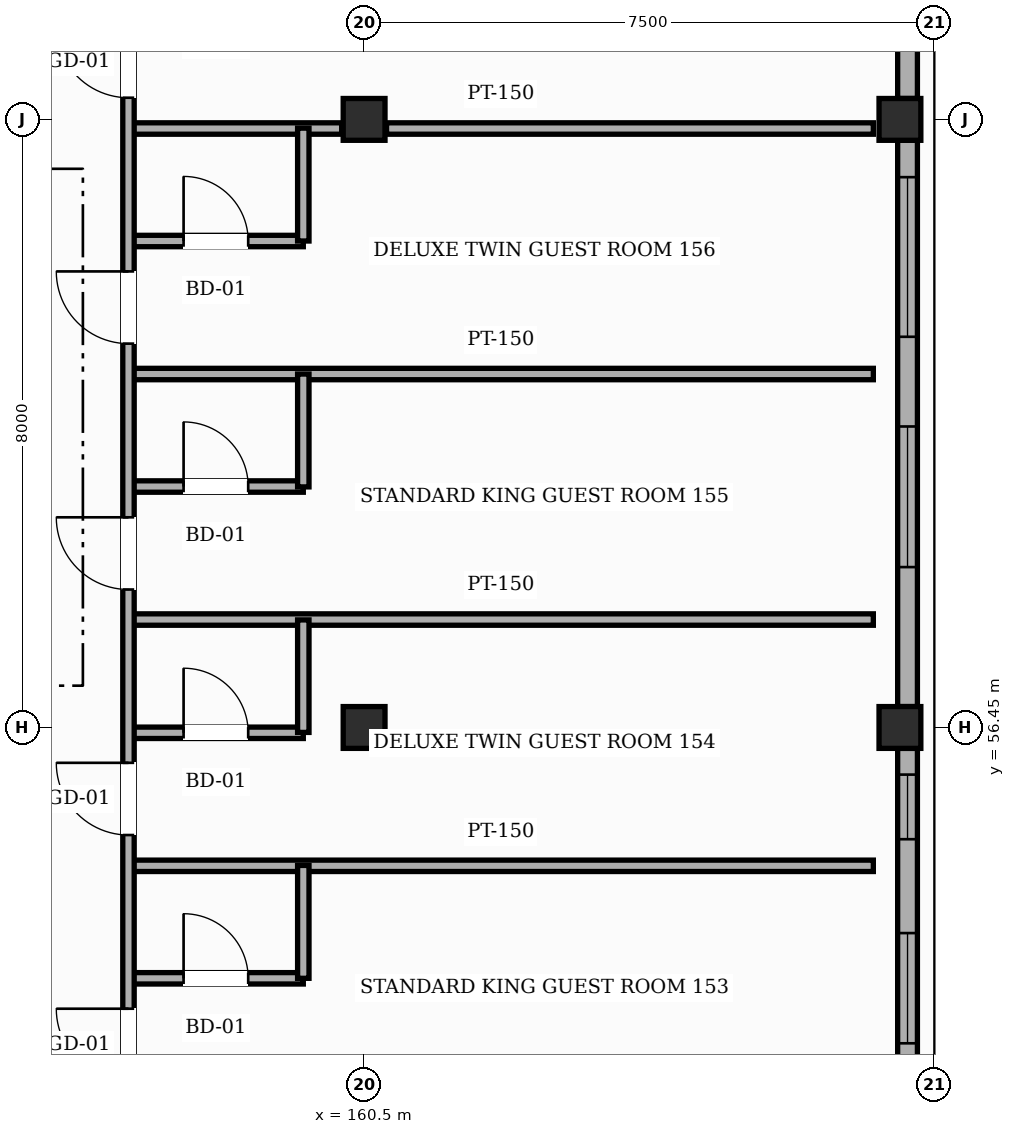
"""IFC4 building model, lengths in metres.
Left out: names, types, materials, properties, quantities, classifications, styles, units other than length and angle.
Written with IfcOpenShell. Run it as: python <this file> out.ifc"""

import sys

from ifc_helpers import new_model, si_unit, direction, frame, frame_2d, origin, origin_2d, place, context, subcontext, project, spatial, rectangle, hollow_rectangle, extrude, element, fill, save


model = new_model("IFC4")
c1 = context("Model", 3, precision=1e-05, world=origin(), true_north=direction((0.0, 1.0)))
c2 = subcontext(c1, "Body", "Model", "MODEL_VIEW")
j1 = project(units=[si_unit("LENGTHUNIT", "METRE"), si_unit("PLANEANGLEUNIT", "RADIAN")], contexts=[c1])
p1 = place(None, origin())
s1 = spatial("IfcSite", under=j1, at=p1, CompositionType="ELEMENT")
p2 = place(p1, origin())
s2 = spatial("IfcBuilding", under=s1, at=p2, CompositionType="ELEMENT")
p3 = place(p2, frame((0.0, 0.0, 28.2)))
s3 = spatial("IfcBuildingStorey", under=s2, at=p3, CompositionType="ELEMENT", Elevation=28.2)
for number, where, z_axis, x_axis in (
    (1, (160.5, 56.45, 0.0), (0.0, 0.0, 1.0), (1.0, 0.0, 0.0)),
    (2, (160.5, 64.45, 0.0), (0.0, 0.0, 1.0), (1.0, 0.0, 0.0)),
    (3, (167.55, 56.45, 0.0), (0.0, 0.0, 1.0), (1.0, 0.0, 0.0)),
    (4, (167.55, 64.45, 0.0), (0.0, 0.0, 1.0), (1.0, 0.0, 0.0)),
):
    element("IfcColumn", number, at=place(p3, frame(where, z_axis=z_axis, x_axis=x_axis)), inside=s3, PredefinedType="COLUMN", context=c2, shape_type="SweptSolid", body=[
        extrude(hollow_rectangle(XDim=0.55, YDim=0.55, WallThickness=0.022, InnerFilletRadius=0.022, OuterFilletRadius=0.044, at=origin_2d()), origin(), (0.0, 0.0, 1.0), 3.6),
    ])
p4 = place(p3, frame((167.65, 56.175, 0.0), z_axis=(0.0, 0.0, 1.0), x_axis=(0.0, -1.0, 0.0)))
e5 = element("IfcWall", 5, at=p4, inside=s3, PredefinedType="SOLIDWALL", context=c2, shape_type="SweptSolid", body=[
    extrude(rectangle(XDim=7.45, YDim=0.26, at=frame_2d((3.725, 0.0))), origin(), (0.0, 0.0, 1.0), 2.755),
])
p5 = place(p4, frame((5.485, 0.0, 0.85)))
e6 = element("IfcOpeningElement", 6, at=p5, cuts=e5, PredefinedType="OPENING", context=c2, shape_type="SweptSolid", body=[
    extrude(rectangle(XDim=1.25, YDim=1.65, at=frame_2d((0.625, 0.825))), frame((0.0, 0.14, 0.0), z_axis=(0.0, -1.0, 0.0), x_axis=(1.0, 0.0, 0.0)), (0.0, 0.0, 1.0), 0.28),
])
p6 = place(p4, frame((2.43, 0.0, 0.85)))
e7 = element("IfcOpeningElement", 7, at=p6, cuts=e5, PredefinedType="OPENING", context=c2, shape_type="SweptSolid", body=[
    extrude(rectangle(XDim=1.45, YDim=1.65, at=frame_2d((0.725, 0.825))), frame((0.0, 0.14, 0.0), z_axis=(0.0, -1.0, 0.0), x_axis=(1.0, 0.0, 0.0)), (0.0, 0.0, 1.0), 0.28),
])
p7 = place(p4, frame((0.345, 0.0, 0.85)))
e8 = element("IfcOpeningElement", 8, at=p7, cuts=e5, PredefinedType="OPENING", context=c2, shape_type="SweptSolid", body=[
    extrude(rectangle(XDim=0.85, YDim=1.35, at=frame_2d((0.425, 0.675))), frame((0.0, 0.14, 0.0), z_axis=(0.0, -1.0, 0.0), x_axis=(1.0, 0.0, 0.0)), (0.0, 0.0, 1.0), 0.28),
])
p8 = place(p3, frame((167.65, 64.175, 0.0), z_axis=(0.0, 0.0, 1.0), x_axis=(0.0, -1.0, 0.0)))
e9 = element("IfcWall", 9, at=p8, inside=s3, PredefinedType="SOLIDWALL", context=c2, shape_type="SweptSolid", body=[
    extrude(rectangle(XDim=7.45, YDim=0.26, at=frame_2d((3.725, 0.0))), origin(), (0.0, 0.0, 1.0), 2.755),
])
p9 = place(p8, frame((3.765, 0.0, 0.85)))
e10 = element("IfcOpeningElement", 10, at=p9, cuts=e9, PredefinedType="OPENING", context=c2, shape_type="SweptSolid", body=[
    extrude(rectangle(XDim=1.85, YDim=1.65, at=frame_2d((0.925, 0.825))), frame((0.0, 0.14, 0.0), z_axis=(0.0, -1.0, 0.0), x_axis=(1.0, 0.0, 0.0)), (0.0, 0.0, 1.0), 0.28),
])
p10 = place(p8, frame((0.485, 0.0, 0.85)))
e11 = element("IfcOpeningElement", 11, at=p10, cuts=e9, PredefinedType="OPENING", context=c2, shape_type="SweptSolid", body=[
    extrude(rectangle(XDim=2.1, YDim=1.65, at=frame_2d((1.05, 0.825))), frame((0.0, 0.14, 0.0), z_axis=(0.0, -1.0, 0.0), x_axis=(1.0, 0.0, 0.0)), (0.0, 0.0, 1.0), 0.28),
])
p11 = place(p3, frame((167.65, 70.8, 0.0), z_axis=(0.0, 0.0, 1.0), x_axis=(0.0, -1.0, 0.0)))
e12 = element("IfcWall", 12, at=p11, inside=s3, PredefinedType="SOLIDWALL", context=c2, shape_type="SweptSolid", body=[
    extrude(rectangle(XDim=6.075, YDim=0.26, at=frame_2d((3.038, 0.0))), origin(), (0.0, 0.0, 1.0), 3.365),
])
p12 = place(p11, frame((4.08, 0.0, 0.85)))
e13 = element("IfcOpeningElement", 13, at=p12, cuts=e12, PredefinedType="OPENING", context=c2, shape_type="SweptSolid", body=[
    extrude(rectangle(XDim=1.15, YDim=1.8, at=frame_2d((0.575, 0.9))), frame((0.0, 0.14, 0.0), z_axis=(0.0, -1.0, 0.0), x_axis=(1.0, 0.0, 0.0)), (0.0, 0.0, 1.0), 0.28),
])
p13 = place(p11, frame((0.94, 0.0, 0.85)))
e14 = element("IfcOpeningElement", 14, at=p13, cuts=e12, PredefinedType="OPENING", context=c2, shape_type="SweptSolid", body=[
    extrude(rectangle(XDim=1.35, YDim=1.8, at=frame_2d((0.675, 0.9))), frame((0.0, 0.14, 0.0), z_axis=(0.0, -1.0, 0.0), x_axis=(1.0, 0.0, 0.0)), (0.0, 0.0, 1.0), 0.28),
])
p14 = place(p3, frame((157.4, 53.15, 0.0), z_axis=(0.0, 0.0, 1.0), x_axis=(1.0, 0.0, 0.0)))
e15 = element("IfcWall", 15, at=p14, inside=s3, PredefinedType="PARTITIONING", context=c2, shape_type="SweptSolid", body=[
    extrude(rectangle(XDim=2.3, YDim=0.15, at=frame_2d((1.15, 0.0))), origin(), (0.0, 0.0, 1.0), 3.365),
])
p15 = place(p14, frame((0.725, 0.0, 0.0)))
e16 = element("IfcOpeningElement", 16, at=p15, cuts=e15, PredefinedType="OPENING", context=c2, shape_type="SweptSolid", body=[
    extrude(rectangle(XDim=0.85, YDim=2.1, at=frame_2d((0.425, 1.05))), frame((0.0, 0.085, 0.0), z_axis=(0.0, -1.0, 0.0), x_axis=(1.0, 0.0, 0.0)), (0.0, 0.0, 1.0), 0.17),
])
p16 = place(p3, frame((157.4, 54.63, 0.0), z_axis=(0.0, 0.0, 1.0), x_axis=(1.0, 0.0, 0.0)))
e17 = element("IfcWall", 17, at=p16, inside=s3, PredefinedType="PARTITIONING", context=c2, shape_type="SweptSolid", body=[
    extrude(rectangle(XDim=9.8, YDim=0.15, at=frame_2d((4.9, 0.0))), origin(), (0.0, 0.0, 1.0), 3.365),
])
p17 = place(p3, frame((157.4, 56.38, 0.0), z_axis=(0.0, 0.0, 1.0), x_axis=(1.0, 0.0, 0.0)))
e18 = element("IfcWall", 18, at=p17, inside=s3, PredefinedType="PARTITIONING", context=c2, shape_type="SweptSolid", body=[
    extrude(rectangle(XDim=2.3, YDim=0.15, at=frame_2d((1.15, 0.0))), origin(), (0.0, 0.0, 1.0), 2.805),
])
p18 = place(p17, frame((0.725, 0.0, 0.0)))
e19 = element("IfcOpeningElement", 19, at=p18, cuts=e18, PredefinedType="OPENING", context=c2, shape_type="SweptSolid", body=[
    extrude(rectangle(XDim=0.85, YDim=2.1, at=frame_2d((0.425, 1.05))), frame((0.0, 0.085, 0.0), z_axis=(0.0, -1.0, 0.0), x_axis=(1.0, 0.0, 0.0)), (0.0, 0.0, 1.0), 0.17),
])
p19 = place(p3, frame((157.4, 57.87, 0.0), z_axis=(0.0, 0.0, 1.0), x_axis=(1.0, 0.0, 0.0)))
e20 = element("IfcWall", 20, at=p19, inside=s3, PredefinedType="PARTITIONING", context=c2, shape_type="SweptSolid", body=[
    extrude(rectangle(XDim=9.8, YDim=0.15, at=frame_2d((4.9, 0.0))), origin(), (0.0, 0.0, 1.0), 3.365),
])
p20 = place(p3, frame((157.4, 59.62, 0.0), z_axis=(0.0, 0.0, 1.0), x_axis=(1.0, 0.0, 0.0)))
e21 = element("IfcWall", 21, at=p20, inside=s3, PredefinedType="PARTITIONING", context=c2, shape_type="SweptSolid", body=[
    extrude(rectangle(XDim=2.3, YDim=0.15, at=frame_2d((1.15, 0.0))), origin(), (0.0, 0.0, 1.0), 3.365),
])
p21 = place(p20, frame((0.725, 0.0, 0.0)))
e22 = element("IfcOpeningElement", 22, at=p21, cuts=e21, PredefinedType="OPENING", context=c2, shape_type="SweptSolid", body=[
    extrude(rectangle(XDim=0.85, YDim=2.1, at=frame_2d((0.425, 1.05))), frame((0.0, 0.085, 0.0), z_axis=(0.0, -1.0, 0.0), x_axis=(1.0, 0.0, 0.0)), (0.0, 0.0, 1.0), 0.17),
])
p22 = place(p3, frame((157.4, 61.1, 0.0), z_axis=(0.0, 0.0, 1.0), x_axis=(1.0, 0.0, 0.0)))
e23 = element("IfcWall", 23, at=p22, inside=s3, PredefinedType="PARTITIONING", context=c2, shape_type="SweptSolid", body=[
    extrude(rectangle(XDim=9.8, YDim=0.15, at=frame_2d((4.9, 0.0))), origin(), (0.0, 0.0, 1.0), 3.365),
])
p23 = place(p3, frame((157.4, 62.85, 0.0), z_axis=(0.0, 0.0, 1.0), x_axis=(1.0, 0.0, 0.0)))
e24 = element("IfcWall", 24, at=p23, inside=s3, PredefinedType="PARTITIONING", context=c2, shape_type="SweptSolid", body=[
    extrude(rectangle(XDim=2.3, YDim=0.15, at=frame_2d((1.15, 0.0))), origin(), (0.0, 0.0, 1.0), 3.365),
])
p24 = place(p23, frame((0.725, 0.0, 0.0)))
e25 = element("IfcOpeningElement", 25, at=p24, cuts=e24, PredefinedType="OPENING", context=c2, shape_type="SweptSolid", body=[
    extrude(rectangle(XDim=0.85, YDim=2.1, at=frame_2d((0.425, 1.05))), frame((0.0, 0.085, 0.0), z_axis=(0.0, -1.0, 0.0), x_axis=(1.0, 0.0, 0.0)), (0.0, 0.0, 1.0), 0.17),
])
p25 = place(p3, frame((157.4, 64.33, 0.0), z_axis=(0.0, 0.0, 1.0), x_axis=(1.0, 0.0, 0.0)))
e26 = element("IfcWall", 26, at=p25, inside=s3, PredefinedType="PARTITIONING", context=c2, shape_type="SweptSolid", body=[
    extrude(rectangle(XDim=2.805, YDim=0.15, at=frame_2d((1.403, 0.0))), origin(), (0.0, 0.0, 1.0), 2.805),
])
p26 = place(p3, frame((160.795, 64.33, 0.0), z_axis=(0.0, 0.0, 1.0), x_axis=(1.0, 0.0, 0.0)))
e27 = element("IfcWall", 27, at=p26, inside=s3, PredefinedType="PARTITIONING", context=c2, shape_type="SweptSolid", body=[
    extrude(rectangle(XDim=6.405, YDim=0.15, at=frame_2d((3.203, 0.0))), origin(), (0.0, 0.0, 1.0), 2.855),
])
p27 = place(p3, frame((157.4, 22.3, 0.0), z_axis=(0.0, 0.0, 1.0), x_axis=(0.0, 1.0, 0.0)))
e28 = element("IfcWall", 28, at=p27, inside=s3, PredefinedType="PARTITIONING", context=c2, shape_type="SweptSolid", body=[
    extrude(rectangle(XDim=48.5, YDim=0.15, at=frame_2d((24.25, 0.0))), origin(), (0.0, 0.0, 1.0), 3.365),
])
p28 = place(p27, frame((0.325, 0.0, 0.0)))
e29 = element("IfcOpeningElement", 29, at=p28, cuts=e28, PredefinedType="OPENING", context=c2, shape_type="SweptSolid", body=[
    extrude(rectangle(XDim=1.1, YDim=2.2, at=frame_2d((0.55, 1.1))), frame((0.0, 0.085, 0.0), z_axis=(0.0, -1.0, 0.0), x_axis=(1.0, 0.0, 0.0)), (0.0, 0.0, 1.0), 0.17),
])
p29 = place(p27, frame((3.635, 0.0, 0.0)))
e30 = element("IfcOpeningElement", 30, at=p29, cuts=e28, PredefinedType="OPENING", context=c2, shape_type="SweptSolid", body=[
    extrude(rectangle(XDim=0.95, YDim=2.15, at=frame_2d((0.475, 1.075))), frame((0.0, 0.085, 0.0), z_axis=(0.0, -1.0, 0.0), x_axis=(1.0, 0.0, 0.0)), (0.0, 0.0, 1.0), 0.17),
])
p30 = place(p27, frame((6.865, 0.0, 0.0)))
e31 = element("IfcOpeningElement", 31, at=p30, cuts=e28, PredefinedType="OPENING", context=c2, shape_type="SweptSolid", body=[
    extrude(rectangle(XDim=0.95, YDim=2.15, at=frame_2d((0.475, 1.075))), frame((0.0, 0.085, 0.0), z_axis=(0.0, -1.0, 0.0), x_axis=(1.0, 0.0, 0.0)), (0.0, 0.0, 1.0), 0.17),
])
p31 = place(p27, frame((10.1, 0.0, 0.0)))
e32 = element("IfcOpeningElement", 32, at=p31, cuts=e28, PredefinedType="OPENING", context=c2, shape_type="SweptSolid", body=[
    extrude(rectangle(XDim=0.95, YDim=2.15, at=frame_2d((0.475, 1.075))), frame((0.0, 0.085, 0.0), z_axis=(0.0, -1.0, 0.0), x_axis=(1.0, 0.0, 0.0)), (0.0, 0.0, 1.0), 0.17),
])
p32 = place(p27, frame((13.335, 0.0, 0.0)))
e33 = element("IfcOpeningElement", 33, at=p32, cuts=e28, PredefinedType="OPENING", context=c2, shape_type="SweptSolid", body=[
    extrude(rectangle(XDim=0.95, YDim=2.15, at=frame_2d((0.475, 1.075))), frame((0.0, 0.085, 0.0), z_axis=(0.0, -1.0, 0.0), x_axis=(1.0, 0.0, 0.0)), (0.0, 0.0, 1.0), 0.17),
])
p33 = place(p27, frame((16.565, 0.0, 0.0)))
e34 = element("IfcOpeningElement", 34, at=p33, cuts=e28, PredefinedType="OPENING", context=c2, shape_type="SweptSolid", body=[
    extrude(rectangle(XDim=0.95, YDim=2.15, at=frame_2d((0.475, 1.075))), frame((0.0, 0.085, 0.0), z_axis=(0.0, -1.0, 0.0), x_axis=(1.0, 0.0, 0.0)), (0.0, 0.0, 1.0), 0.17),
])
p34 = place(p27, frame((19.8, 0.0, 0.0)))
e35 = element("IfcOpeningElement", 35, at=p34, cuts=e28, PredefinedType="OPENING", context=c2, shape_type="SweptSolid", body=[
    extrude(rectangle(XDim=0.95, YDim=2.15, at=frame_2d((0.475, 1.075))), frame((0.0, 0.085, 0.0), z_axis=(0.0, -1.0, 0.0), x_axis=(1.0, 0.0, 0.0)), (0.0, 0.0, 1.0), 0.17),
])
p35 = place(p27, frame((23.035, 0.0, 0.0)))
e36 = element("IfcOpeningElement", 36, at=p35, cuts=e28, PredefinedType="OPENING", context=c2, shape_type="SweptSolid", body=[
    extrude(rectangle(XDim=0.95, YDim=2.15, at=frame_2d((0.475, 1.075))), frame((0.0, 0.085, 0.0), z_axis=(0.0, -1.0, 0.0), x_axis=(1.0, 0.0, 0.0)), (0.0, 0.0, 1.0), 0.17),
])
p36 = place(p27, frame((26.265, 0.0, 0.0)))
e37 = element("IfcOpeningElement", 37, at=p36, cuts=e28, PredefinedType="OPENING", context=c2, shape_type="SweptSolid", body=[
    extrude(rectangle(XDim=0.95, YDim=2.15, at=frame_2d((0.475, 1.075))), frame((0.0, 0.085, 0.0), z_axis=(0.0, -1.0, 0.0), x_axis=(1.0, 0.0, 0.0)), (0.0, 0.0, 1.0), 0.17),
])
p37 = place(p27, frame((29.5, 0.0, 0.0)))
e38 = element("IfcOpeningElement", 38, at=p37, cuts=e28, PredefinedType="OPENING", context=c2, shape_type="SweptSolid", body=[
    extrude(rectangle(XDim=0.95, YDim=2.15, at=frame_2d((0.475, 1.075))), frame((0.0, 0.085, 0.0), z_axis=(0.0, -1.0, 0.0), x_axis=(1.0, 0.0, 0.0)), (0.0, 0.0, 1.0), 0.17),
])
p38 = place(p27, frame((32.735, 0.0, 0.0)))
e39 = element("IfcOpeningElement", 39, at=p38, cuts=e28, PredefinedType="OPENING", context=c2, shape_type="SweptSolid", body=[
    extrude(rectangle(XDim=0.95, YDim=2.15, at=frame_2d((0.475, 1.075))), frame((0.0, 0.085, 0.0), z_axis=(0.0, -1.0, 0.0), x_axis=(1.0, 0.0, 0.0)), (0.0, 0.0, 1.0), 0.17),
])
p39 = place(p27, frame((35.965, 0.0, 0.0)))
e40 = element("IfcOpeningElement", 40, at=p39, cuts=e28, PredefinedType="OPENING", context=c2, shape_type="SweptSolid", body=[
    extrude(rectangle(XDim=0.95, YDim=2.15, at=frame_2d((0.475, 1.075))), frame((0.0, 0.085, 0.0), z_axis=(0.0, -1.0, 0.0), x_axis=(1.0, 0.0, 0.0)), (0.0, 0.0, 1.0), 0.17),
])
p40 = place(p27, frame((39.2, 0.0, 0.0)))
e41 = element("IfcOpeningElement", 41, at=p40, cuts=e28, PredefinedType="OPENING", context=c2, shape_type="SweptSolid", body=[
    extrude(rectangle(XDim=0.95, YDim=2.15, at=frame_2d((0.475, 1.075))), frame((0.0, 0.085, 0.0), z_axis=(0.0, -1.0, 0.0), x_axis=(1.0, 0.0, 0.0)), (0.0, 0.0, 1.0), 0.17),
])
p41 = place(p27, frame((42.435, 0.0, 0.0)))
e42 = element("IfcOpeningElement", 42, at=p41, cuts=e28, PredefinedType="OPENING", context=c2, shape_type="SweptSolid", body=[
    extrude(rectangle(XDim=0.95, YDim=2.15, at=frame_2d((0.475, 1.075))), frame((0.0, 0.085, 0.0), z_axis=(0.0, -1.0, 0.0), x_axis=(1.0, 0.0, 0.0)), (0.0, 0.0, 1.0), 0.17),
])
p42 = place(p27, frame((45.665, 0.0, 0.0)))
e43 = element("IfcOpeningElement", 43, at=p42, cuts=e28, PredefinedType="OPENING", context=c2, shape_type="SweptSolid", body=[
    extrude(rectangle(XDim=0.95, YDim=2.15, at=frame_2d((0.475, 1.075))), frame((0.0, 0.085, 0.0), z_axis=(0.0, -1.0, 0.0), x_axis=(1.0, 0.0, 0.0)), (0.0, 0.0, 1.0), 0.17),
])
p43 = place(p3, frame((159.7, 53.15, 0.0), z_axis=(0.0, 0.0, 1.0), x_axis=(0.0, 1.0, 0.0)))
e44 = element("IfcWall", 44, at=p43, inside=s3, PredefinedType="PARTITIONING", context=c2, shape_type="SweptSolid", body=[
    extrude(rectangle(XDim=1.485, YDim=0.15, at=frame_2d((0.743, 0.0))), origin(), (0.0, 0.0, 1.0), 3.365),
])
p44 = place(p3, frame((159.7, 56.385, 0.0), z_axis=(0.0, 0.0, 1.0), x_axis=(0.0, 1.0, 0.0)))
e45 = element("IfcWall", 45, at=p44, inside=s3, PredefinedType="PARTITIONING", context=c2, shape_type="SweptSolid", body=[
    extrude(rectangle(XDim=1.48, YDim=0.15, at=frame_2d((0.74, 0.0))), origin(), (0.0, 0.0, 1.0), 3.365),
])
p45 = place(p3, frame((159.7, 59.615, 0.0), z_axis=(0.0, 0.0, 1.0), x_axis=(0.0, 1.0, 0.0)))
e46 = element("IfcWall", 46, at=p45, inside=s3, PredefinedType="PARTITIONING", context=c2, shape_type="SweptSolid", body=[
    extrude(rectangle(XDim=1.485, YDim=0.15, at=frame_2d((0.743, 0.0))), origin(), (0.0, 0.0, 1.0), 3.365),
])
p46 = place(p3, frame((159.7, 62.85, 0.0), z_axis=(0.0, 0.0, 1.0), x_axis=(0.0, 1.0, 0.0)))
e47 = element("IfcWall", 47, at=p46, inside=s3, PredefinedType="PARTITIONING", context=c2, shape_type="SweptSolid", body=[
    extrude(rectangle(XDim=1.485, YDim=0.15, at=frame_2d((0.742, 0.0))), origin(), (0.0, 0.0, 1.0), 3.365),
])
p47 = place(p6, origin())
e48 = element("IfcWindow", 48, at=p47, inside=s3, PartitioningType="SINGLE_PANEL", PredefinedType="WINDOW", context=c2, shape_type="SweptSolid", body=[
    extrude(rectangle(XDim=1.45, YDim=1.65, at=frame_2d((0.725, 0.825))), frame((0.0, 0.03, 0.0), z_axis=(0.0, -1.0, 0.0), x_axis=(1.0, 0.0, 0.0)), (0.0, 0.0, 1.0), 0.06),
])
fill(e7, e48)
p48 = place(p7, origin())
e49 = element("IfcWindow", 49, at=p48, inside=s3, PartitioningType="SINGLE_PANEL", PredefinedType="WINDOW", context=c2, shape_type="SweptSolid", body=[
    extrude(rectangle(XDim=0.85, YDim=1.35, at=frame_2d((0.425, 0.675))), frame((0.0, 0.03, 0.0), z_axis=(0.0, -1.0, 0.0), x_axis=(1.0, 0.0, 0.0)), (0.0, 0.0, 1.0), 0.06),
])
fill(e8, e49)
p49 = place(p9, origin())
e50 = element("IfcWindow", 50, at=p49, inside=s3, PartitioningType="SINGLE_PANEL", PredefinedType="WINDOW", context=c2, shape_type="SweptSolid", body=[
    extrude(rectangle(XDim=1.85, YDim=1.65, at=frame_2d((0.925, 0.825))), frame((0.0, 0.03, 0.0), z_axis=(0.0, -1.0, 0.0), x_axis=(1.0, 0.0, 0.0)), (0.0, 0.0, 1.0), 0.06),
])
fill(e10, e50)
p50 = place(p10, origin())
e51 = element("IfcWindow", 51, at=p50, inside=s3, PartitioningType="SINGLE_PANEL", PredefinedType="WINDOW", context=c2, shape_type="SweptSolid", body=[
    extrude(rectangle(XDim=2.1, YDim=1.65, at=frame_2d((1.05, 0.825))), frame((0.0, 0.03, 0.0), z_axis=(0.0, -1.0, 0.0), x_axis=(1.0, 0.0, 0.0)), (0.0, 0.0, 1.0), 0.06),
])
fill(e11, e51)
p51 = place(p37, origin())
e52 = element("IfcDoor", 52, at=p51, inside=s3, OperationType="SINGLE_SWING_RIGHT", PredefinedType="DOOR", context=c2, shape_type="SweptSolid", body=[
    extrude(rectangle(XDim=0.95, YDim=2.15, at=frame_2d((0.475, 1.075))), frame((0.0, 0.025, 0.0), z_axis=(0.0, -1.0, 0.0), x_axis=(1.0, 0.0, 0.0)), (0.0, 0.0, 1.0), 0.05),
])
fill(e38, e52)
p52 = place(p15, origin())
e53 = element("IfcDoor", 53, at=p52, inside=s3, OperationType="SINGLE_SWING_LEFT", PredefinedType="DOOR", context=c2, shape_type="SweptSolid", body=[
    extrude(rectangle(XDim=0.85, YDim=2.1, at=frame_2d((0.425, 1.05))), frame((0.0, 0.025, 0.0), z_axis=(0.0, -1.0, 0.0), x_axis=(1.0, 0.0, 0.0)), (0.0, 0.0, 1.0), 0.05),
])
fill(e16, e53)
p53 = place(p38, origin())
e54 = element("IfcDoor", 54, at=p53, inside=s3, OperationType="SINGLE_SWING_RIGHT", PredefinedType="DOOR", context=c2, shape_type="SweptSolid", body=[
    extrude(rectangle(XDim=0.95, YDim=2.15, at=frame_2d((0.475, 1.075))), frame((0.0, 0.025, 0.0), z_axis=(0.0, -1.0, 0.0), x_axis=(1.0, 0.0, 0.0)), (0.0, 0.0, 1.0), 0.05),
])
fill(e39, e54)
p54 = place(p18, origin())
e55 = element("IfcDoor", 55, at=p54, inside=s3, OperationType="SINGLE_SWING_LEFT", PredefinedType="DOOR", context=c2, shape_type="SweptSolid", body=[
    extrude(rectangle(XDim=0.85, YDim=2.1, at=frame_2d((0.425, 1.05))), frame((0.0, 0.025, 0.0), z_axis=(0.0, -1.0, 0.0), x_axis=(1.0, 0.0, 0.0)), (0.0, 0.0, 1.0), 0.05),
])
fill(e19, e55)
p55 = place(p39, origin())
e56 = element("IfcDoor", 56, at=p55, inside=s3, OperationType="SINGLE_SWING_RIGHT", PredefinedType="DOOR", context=c2, shape_type="SweptSolid", body=[
    extrude(rectangle(XDim=0.95, YDim=2.15, at=frame_2d((0.475, 1.075))), frame((0.0, 0.025, 0.0), z_axis=(0.0, -1.0, 0.0), x_axis=(1.0, 0.0, 0.0)), (0.0, 0.0, 1.0), 0.05),
])
fill(e40, e56)
p56 = place(p21, origin())
e57 = element("IfcDoor", 57, at=p56, inside=s3, OperationType="SINGLE_SWING_LEFT", PredefinedType="DOOR", context=c2, shape_type="SweptSolid", body=[
    extrude(rectangle(XDim=0.85, YDim=2.1, at=frame_2d((0.425, 1.05))), frame((0.0, 0.025, 0.0), z_axis=(0.0, -1.0, 0.0), x_axis=(1.0, 0.0, 0.0)), (0.0, 0.0, 1.0), 0.05),
])
fill(e22, e57)
p57 = place(p40, origin())
e58 = element("IfcDoor", 58, at=p57, inside=s3, OperationType="SINGLE_SWING_RIGHT", PredefinedType="DOOR", context=c2, shape_type="SweptSolid", body=[
    extrude(rectangle(XDim=0.95, YDim=2.15, at=frame_2d((0.475, 1.075))), frame((0.0, 0.025, 0.0), z_axis=(0.0, -1.0, 0.0), x_axis=(1.0, 0.0, 0.0)), (0.0, 0.0, 1.0), 0.05),
])
fill(e41, e58)
p58 = place(p24, origin())
e59 = element("IfcDoor", 59, at=p58, inside=s3, OperationType="SINGLE_SWING_LEFT", PredefinedType="DOOR", context=c2, shape_type="SweptSolid", body=[
    extrude(rectangle(XDim=0.85, YDim=2.1, at=frame_2d((0.425, 1.05))), frame((0.0, 0.025, 0.0), z_axis=(0.0, -1.0, 0.0), x_axis=(1.0, 0.0, 0.0)), (0.0, 0.0, 1.0), 0.05),
])
fill(e25, e59)
p59 = place(p41, origin())
e60 = element("IfcDoor", 60, at=p59, inside=s3, OperationType="SINGLE_SWING_RIGHT", PredefinedType="DOOR", context=c2, shape_type="SweptSolid", body=[
    extrude(rectangle(XDim=0.95, YDim=2.15, at=frame_2d((0.475, 1.075))), frame((0.0, 0.025, 0.0), z_axis=(0.0, -1.0, 0.0), x_axis=(1.0, 0.0, 0.0)), (0.0, 0.0, 1.0), 0.05),
])
fill(e42, e60)
save(model, sys.argv[1])
